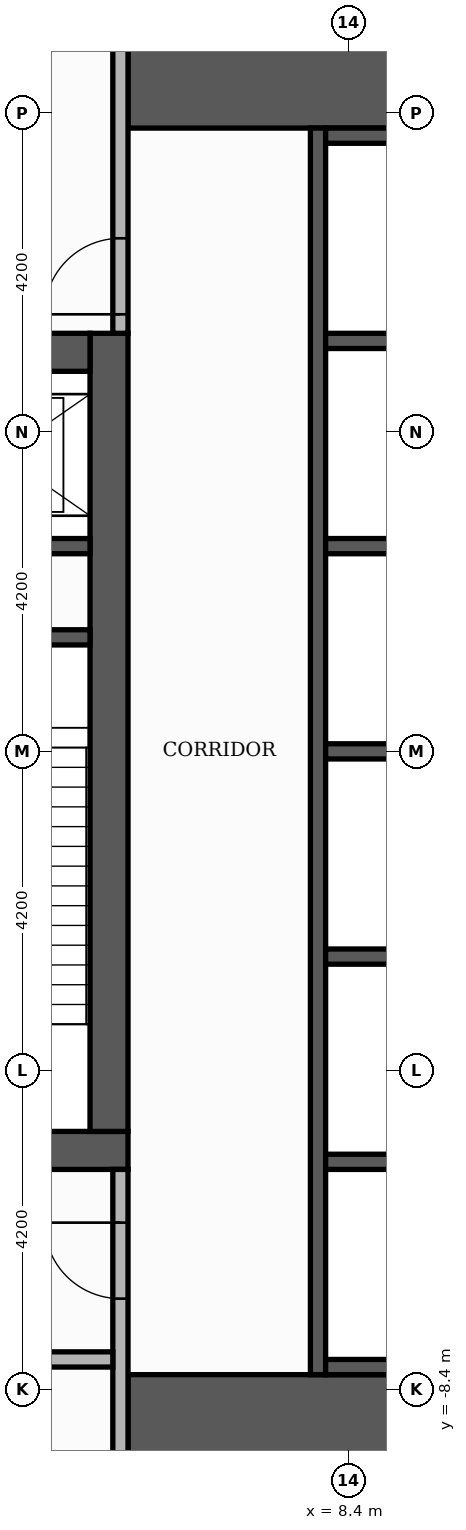
"""IFC4 building model, lengths in metres.
Left out: names, types, materials, properties, quantities, classifications, styles, units other than length and angle.
Written with IfcOpenShell. Run it as: python <this file> out.ifc"""

import sys

from ifc_helpers import new_model, si_unit, direction, frame, frame_2d, origin, place, context, subcontext, project, spatial, rectangle, extrude, element, fill, save


model = new_model("IFC4")
c1 = context("Model", 3, precision=1e-05, world=origin(), true_north=direction((0.0, 1.0)))
c2 = subcontext(c1, "Body", "Model", "MODEL_VIEW")
j1 = project(units=[si_unit("LENGTHUNIT", "METRE"), si_unit("PLANEANGLEUNIT", "RADIAN")], contexts=[c1])
p1 = place(None, origin())
s1 = spatial("IfcSite", under=j1, at=p1, CompositionType="ELEMENT")
p2 = place(p1, origin())
s2 = spatial("IfcBuilding", under=s1, at=p2, CompositionType="ELEMENT")
p3 = place(p2, frame((0.0, 0.0, 287.4)))
s3 = spatial("IfcBuildingStorey", under=s2, at=p3, CompositionType="ELEMENT", Elevation=287.4)
p4 = place(p3, frame((-5.5, -5.25, 0.0), z_axis=(0.0, 0.0, 1.0), x_axis=(1.0, 0.0, 0.0)))
e1 = element("IfcWall", 1, at=p4, inside=s3, PredefinedType="SHEAR", context=c2, shape_type="SweptSolid", body=[
    extrude(rectangle(XDim=11.0, YDim=0.5, at=frame_2d((5.5, 0.0))), origin(), (0.0, 0.0, 1.0), 5.05),
])
p5 = place(p4, frame((4.9, 0.0, 0.0)))
e2 = element("IfcOpeningElement", 2, at=p5, cuts=e1, PredefinedType="OPENING", context=c2, shape_type="SweptSolid", body=[
    extrude(rectangle(XDim=1.2, YDim=2.1, at=frame_2d((0.6, 1.05))), frame((0.0, 0.26, 0.0), z_axis=(0.0, -1.0, 0.0), x_axis=(1.0, 0.0, 0.0)), (0.0, 0.0, 1.0), 0.52),
])
p6 = place(p3, frame((5.25, -5.0, 0.0), z_axis=(0.0, 0.0, 1.0), x_axis=(0.0, 1.0, 0.0)))
e3 = element("IfcWall", 3, at=p6, inside=s3, PredefinedType="SHEAR", context=c2, shape_type="SweptSolid", body=[
    extrude(rectangle(XDim=10.5, YDim=0.5, at=frame_2d((5.25, 0.0))), origin(), (0.0, 0.0, 1.0), 5.05),
])
p7 = place(p3, frame((-5.0, 5.25, 0.0), z_axis=(0.0, 0.0, 1.0), x_axis=(1.0, 0.0, 0.0)))
e4 = element("IfcWall", 4, at=p7, inside=s3, PredefinedType="SHEAR", context=c2, shape_type="SweptSolid", body=[
    extrude(rectangle(XDim=10.0, YDim=0.5, at=frame_2d((5.0, 0.0))), origin(), (0.0, 0.0, 1.0), 5.05),
])
p8 = place(p7, frame((4.4, 0.0, 0.0)))
e5 = element("IfcOpeningElement", 5, at=p8, cuts=e4, PredefinedType="OPENING", context=c2, shape_type="SweptSolid", body=[
    extrude(rectangle(XDim=1.2, YDim=2.1, at=frame_2d((0.6, 1.05))), frame((0.0, 0.26, 0.0), z_axis=(0.0, -1.0, 0.0), x_axis=(1.0, 0.0, 0.0)), (0.0, 0.0, 1.0), 0.52),
])
for number, where, z_axis, x_axis in (
    (6, (5.5, -9.15, 0.0), (0.0, 0.0, 1.0), (1.0, 0.0, 0.0)),
    (7, (5.5, 9.15, 0.0), (0.0, 0.0, 1.0), (1.0, 0.0, 0.0)),
):
    element("IfcWall", number, at=place(p3, frame(where, z_axis=z_axis, x_axis=x_axis)), inside=s3, PredefinedType="SHEAR", context=c2, shape_type="SweptSolid", body=[
        extrude(rectangle(XDim=4.6, YDim=1.9, at=frame_2d((2.3, 0.0))), origin(), (0.0, 0.0, 1.0), 5.05),
    ])
p9 = place(p3, frame((2.15, 1.5, 0.0), z_axis=(0.0, 0.0, 1.0), x_axis=(1.0, 0.0, 0.0)))
e8 = element("IfcWall", 8, at=p9, inside=s3, PredefinedType="SHEAR", context=c2, shape_type="SweptSolid", body=[
    extrude(rectangle(XDim=2.85, YDim=0.2, at=frame_2d((1.425, 0.0))), origin(), (0.0, 0.0, 1.0), 5.05),
])
p10 = place(p3, frame((8.0, -8.2, 0.0), z_axis=(0.0, 0.0, 1.0), x_axis=(0.0, 1.0, 0.0)))
e9 = element("IfcWall", 9, at=p10, inside=s3, PredefinedType="SHEAR", context=c2, shape_type="SweptSolid", body=[
    extrude(rectangle(XDim=16.4, YDim=0.2, at=frame_2d((8.2, 0.0))), origin(), (0.0, 0.0, 1.0), 5.05),
])
for number, where, z_axis, x_axis in (
    (10, (8.1, -8.1, 0.0), (0.0, 0.0, 1.0), (1.0, 0.0, 0.0)),
    (11, (8.1, -5.4, 0.0), (0.0, 0.0, 1.0), (1.0, 0.0, 0.0)),
    (12, (8.1, -2.7, 0.0), (0.0, 0.0, 1.0), (1.0, 0.0, 0.0)),
    (13, (8.1, 0.0, 0.0), (0.0, 0.0, 1.0), (1.0, 0.0, 0.0)),
):
    element("IfcWall", number, at=place(p3, frame(where, z_axis=z_axis, x_axis=x_axis)), inside=s3, PredefinedType="SHEAR", context=c2, shape_type="SweptSolid", body=[
        extrude(rectangle(XDim=2.0, YDim=0.2, at=frame_2d((1.0, 0.0))), origin(), (0.0, 0.0, 1.0), 5.05),
    ])
p11 = place(p3, frame((2.15, 2.7, 0.0), z_axis=(0.0, 0.0, 1.0), x_axis=(1.0, 0.0, 0.0)))
e14 = element("IfcWall", 14, at=p11, inside=s3, PredefinedType="SHEAR", context=c2, shape_type="SweptSolid", body=[
    extrude(rectangle(XDim=2.85, YDim=0.2, at=frame_2d((1.425, 0.0))), origin(), (0.0, 0.0, 1.0), 5.05),
])
for number, where, z_axis, x_axis in (
    (15, (8.1, 2.7, 0.0), (0.0, 0.0, 1.0), (1.0, 0.0, 0.0)),
    (16, (8.1, 5.4, 0.0), (0.0, 0.0, 1.0), (1.0, 0.0, 0.0)),
    (17, (8.1, 8.1, 0.0), (0.0, 0.0, 1.0), (1.0, 0.0, 0.0)),
):
    element("IfcWall", number, at=place(p3, frame(where, z_axis=z_axis, x_axis=x_axis)), inside=s3, PredefinedType="SHEAR", context=c2, shape_type="SweptSolid", body=[
        extrude(rectangle(XDim=2.0, YDim=0.2, at=frame_2d((1.0, 0.0))), origin(), (0.0, 0.0, 1.0), 5.05),
    ])
p12 = place(p3, frame((5.4, -10.1, 0.0), z_axis=(0.0, 0.0, 1.0), x_axis=(0.0, 1.0, 0.0)))
e18 = element("IfcWall", 18, at=p12, inside=s3, PredefinedType="PARTITIONING", context=c2, shape_type="SweptSolid", body=[
    extrude(rectangle(XDim=4.6, YDim=0.2, at=frame_2d((2.3, 0.0))), origin(), (0.0, 0.0, 1.0), 5.05),
])
p13 = place(p12, frame((2.9, 0.0, 0.0)))
e19 = element("IfcOpeningElement", 19, at=p13, cuts=e18, PredefinedType="OPENING", context=c2, shape_type="SweptSolid", body=[
    extrude(rectangle(XDim=1.0, YDim=2.1, at=frame_2d((0.5, 1.05))), frame((0.0, 0.11, 0.0), z_axis=(0.0, -1.0, 0.0), x_axis=(1.0, 0.0, 0.0)), (0.0, 0.0, 1.0), 0.22),
])
p14 = place(p3, frame((0.1, -8.0, 0.0), z_axis=(0.0, 0.0, 1.0), x_axis=(1.0, 0.0, 0.0)))
e20 = element("IfcWall", 20, at=p14, inside=s3, PredefinedType="PARTITIONING", context=c2, shape_type="SweptSolid", body=[
    extrude(rectangle(XDim=5.2, YDim=0.2, at=frame_2d((2.6, 0.0))), origin(), (0.0, 0.0, 1.0), 5.05),
])
p15 = place(p14, frame((2.15, 0.0, 0.0)))
e21 = element("IfcOpeningElement", 21, at=p15, cuts=e20, PredefinedType="OPENING", context=c2, shape_type="SweptSolid", body=[
    extrude(rectangle(XDim=0.9, YDim=2.1, at=frame_2d((0.45, 1.05))), frame((0.0, 0.11, 0.0), z_axis=(0.0, -1.0, 0.0), x_axis=(1.0, 0.0, 0.0)), (0.0, 0.0, 1.0), 0.22),
])
p16 = place(p3, frame((5.4, 5.5, 0.0), z_axis=(0.0, 0.0, 1.0), x_axis=(0.0, 1.0, 0.0)))
e22 = element("IfcWall", 22, at=p16, inside=s3, PredefinedType="PARTITIONING", context=c2, shape_type="SweptSolid", body=[
    extrude(rectangle(XDim=4.6, YDim=0.2, at=frame_2d((2.3, 0.0))), origin(), (0.0, 0.0, 1.0), 5.05),
])
p17 = place(p16, frame((0.25, 0.0, 0.0)))
e23 = element("IfcOpeningElement", 23, at=p17, cuts=e22, PredefinedType="OPENING", context=c2, shape_type="SweptSolid", body=[
    extrude(rectangle(XDim=1.0, YDim=2.1, at=frame_2d((0.5, 1.05))), frame((0.0, 0.11, 0.0), z_axis=(0.0, -1.0, 0.0), x_axis=(1.0, 0.0, 0.0)), (0.0, 0.0, 1.0), 0.22),
])
p18 = place(p17, origin())
e24 = element("IfcDoor", 24, at=p18, inside=s3, OperationType="SINGLE_SWING_LEFT", PredefinedType="DOOR", context=c2, shape_type="SweptSolid", body=[
    extrude(rectangle(XDim=1.0, YDim=2.1, at=frame_2d((0.5, 1.05))), frame((0.0, 0.025, 0.0), z_axis=(0.0, -1.0, 0.0), x_axis=(1.0, 0.0, 0.0)), (0.0, 0.0, 1.0), 0.05),
])
fill(e23, e24)
p19 = place(p13, origin())
e25 = element("IfcDoor", 25, at=p19, inside=s3, OperationType="SINGLE_SWING_RIGHT", PredefinedType="DOOR", context=c2, shape_type="SweptSolid", body=[
    extrude(rectangle(XDim=1.0, YDim=2.1, at=frame_2d((0.5, 1.05))), frame((0.0, 0.025, 0.0), z_axis=(0.0, -1.0, 0.0), x_axis=(1.0, 0.0, 0.0)), (0.0, 0.0, 1.0), 0.05),
])
fill(e19, e25)
save(model, sys.argv[1])
